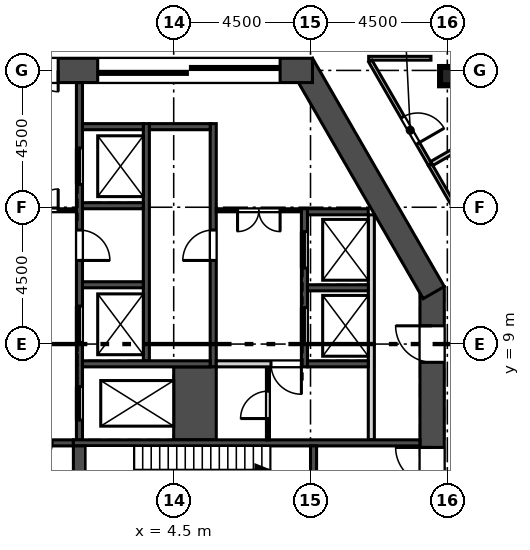
"""IFC4 building model, lengths in metres.
Left out: names, types, materials, properties, quantities, classifications, styles, units other than length and angle.
Written with IfcOpenShell. Run it as: python <this file> out.ifc"""

import sys

from ifc_helpers import new_model, si_unit, direction, frame, frame_2d, origin, origin_2d, place, context, subcontext, project, spatial, rectangle, hollow_rectangle, extrude, element, fill, save


model = new_model("IFC4")
c1 = context("Model", 3, precision=1e-05, world=origin(), true_north=direction((0.0, 1.0)))
c2 = subcontext(c1, "Body", "Model", "MODEL_VIEW")
j1 = project(units=[si_unit("LENGTHUNIT", "METRE"), si_unit("PLANEANGLEUNIT", "RADIAN")], contexts=[c1])
p1 = place(None, origin())
s1 = spatial("IfcSite", under=j1, at=p1, CompositionType="ELEMENT")
p2 = place(p1, origin())
s2 = spatial("IfcBuilding", under=s1, at=p2, CompositionType="ELEMENT")
p3 = place(p2, frame((0.0, 0.0, 344.7)))
s3 = spatial("IfcBuildingStorey", under=s2, at=p3, CompositionType="ELEMENT", Elevation=344.7)
p4 = place(p3, frame((13.562, 17.812, 0.0), z_axis=(0.0, 0.0, 1.0), x_axis=(1.0, 0.0, 0.0)))
e1 = element("IfcColumn", 1, at=p4, inside=s3, PredefinedType="COLUMN", context=c2, shape_type="SweptSolid", body=[
    extrude(hollow_rectangle(XDim=0.6, YDim=0.6, WallThickness=0.03, at=origin_2d()), origin(), (0.0, 0.0, 1.0), 4.8),
])
p5 = place(p3, frame((13.0, 1.45, 0.0), z_axis=(0.0, 0.0, 1.0), x_axis=(0.0, 1.0, 0.0)))
e2 = element("IfcWall", 2, at=p5, inside=s3, PredefinedType="SHEAR", context=c2, shape_type="SweptSolid", body=[
    extrude(rectangle(XDim=9.442, YDim=0.8, at=frame_2d((4.721, 0.0))), origin(), (0.0, 0.0, 1.0), 4.8),
])
p6 = place(p5, frame((2.95, 0.0, 0.0)))
e3 = element("IfcOpeningElement", 3, at=p6, cuts=e2, PredefinedType="OPENING", context=c2, shape_type="SweptSolid", body=[
    extrude(rectangle(XDim=1.2, YDim=2.1, at=frame_2d((0.6, 1.05))), frame((0.0, 0.41, 0.0), z_axis=(0.0, -1.0, 0.0), x_axis=(1.0, 0.0, 0.0)), (0.0, 0.0, 1.0), 0.82),
])
p7 = place(p5, frame((6.95, 0.0, 0.0)))
e4 = element("IfcOpeningElement", 4, at=p7, cuts=e2, PredefinedType="OPENING", context=c2, shape_type="SweptSolid", body=[
    extrude(rectangle(XDim=1.2, YDim=2.1, at=frame_2d((0.6, 1.05))), frame((0.0, 0.41, 0.0), z_axis=(0.0, -1.0, 0.0), x_axis=(1.0, 0.0, 0.0)), (0.0, 0.0, 1.0), 0.82),
])
p8 = place(p3, frame((13.054, 10.692, 0.0), z_axis=(0.0, 0.0, 1.0), x_axis=(-0.500015780397, 0.866016292776, 0.0)))
e5 = element("IfcWall", 5, at=p8, inside=s3, PredefinedType="SHEAR", context=c2, shape_type="SweptSolid", body=[
    extrude(rectangle(XDim=8.67, YDim=0.8, at=frame_2d((4.335, 0.0))), origin(), (0.0, 0.0, 1.0), 4.8),
])
p9 = place(p3, frame((9.065, 18.0, 0.0), z_axis=(0.0, 0.0, 1.0), x_axis=(-1.0, 0.0, 0.0)))
e6 = element("IfcWall", 6, at=p9, inside=s3, PredefinedType="SHEAR", context=c2, shape_type="SweptSolid", body=[
    extrude(rectangle(XDim=18.13, YDim=0.8, at=frame_2d((9.065, 0.0))), origin(), (0.0, 0.0, 1.0), 4.8),
])
p10 = place(p9, frame((8.365, 0.0, 0.0)))
e7 = element("IfcOpeningElement", 7, at=p10, cuts=e6, PredefinedType="OPENING", context=c2, shape_type="SweptSolid", body=[
    extrude(rectangle(XDim=1.4, YDim=2.1, at=frame_2d((0.7, 1.05))), frame((0.0, 0.41, 0.0), z_axis=(0.0, -1.0, 0.0), x_axis=(1.0, 0.0, 0.0)), (0.0, 0.0, 1.0), 0.82),
])
p11 = place(p9, frame((11.065, 0.0, 0.0)))
e8 = element("IfcOpeningElement", 8, at=p11, cuts=e6, PredefinedType="OPENING", context=c2, shape_type="SweptSolid", body=[
    extrude(rectangle(XDim=6.0, YDim=2.4, at=frame_2d((3.0, 1.2))), frame((0.0, 0.41, 0.0), z_axis=(0.0, -1.0, 0.0), x_axis=(1.0, 0.0, 0.0)), (0.0, 0.0, 1.0), 0.82),
])
p12 = place(p9, frame((1.065, 0.0, 0.0)))
e9 = element("IfcOpeningElement", 9, at=p12, cuts=e6, PredefinedType="OPENING", context=c2, shape_type="SweptSolid", body=[
    extrude(rectangle(XDim=6.0, YDim=2.4, at=frame_2d((3.0, 1.2))), frame((0.0, 0.41, 0.0), z_axis=(0.0, -1.0, 0.0), x_axis=(1.0, 0.0, 0.0)), (0.0, 0.0, 1.0), 0.82),
])
p13 = place(p3, frame((11.0, 5.85, 0.0), z_axis=(0.0, 0.0, 1.0), x_axis=(0.0, 1.0, 0.0)))
e10 = element("IfcWall", 10, at=p13, inside=s3, PredefinedType="SOLIDWALL", context=c2, shape_type="SweptSolid", body=[
    extrude(rectangle(XDim=7.4, YDim=0.2, at=frame_2d((3.7, 0.0))), origin(), (0.0, 0.0, 1.0), 4.8),
])
p14 = place(p3, frame((8.8, 8.25, -0.8), z_axis=(0.0, 0.0, 1.0), x_axis=(0.0, 1.0, 0.0)))
e11 = element("IfcWall", 11, at=p14, inside=s3, PredefinedType="SOLIDWALL", context=c2, shape_type="SweptSolid", body=[
    extrude(rectangle(XDim=5.2, YDim=0.2, at=frame_2d((2.6, 0.0))), origin(), (0.0, 0.0, 1.0), 5.6),
])
p15 = place(p14, frame((0.75, 0.0, 0.8)))
e12 = element("IfcOpeningElement", 12, at=p15, cuts=e11, PredefinedType="OPENING", context=c2, shape_type="SweptSolid", body=[
    extrude(rectangle(XDim=1.2, YDim=2.1, at=frame_2d((0.6, 1.05))), frame((0.0, 0.11, 0.0), z_axis=(0.0, -1.0, 0.0), x_axis=(1.0, 0.0, 0.0)), (0.0, 0.0, 1.0), 0.22),
])
p16 = place(p14, frame((3.25, 0.0, 0.8)))
e13 = element("IfcOpeningElement", 13, at=p16, cuts=e11, PredefinedType="OPENING", context=c2, shape_type="SweptSolid", body=[
    extrude(rectangle(XDim=1.2, YDim=2.1, at=frame_2d((0.6, 1.05))), frame((0.0, 0.11, 0.0), z_axis=(0.0, -1.0, 0.0), x_axis=(1.0, 0.0, 0.0)), (0.0, 0.0, 1.0), 0.22),
])
p17 = place(p3, frame((5.8, 8.25, -0.8), z_axis=(0.0, 0.0, 1.0), x_axis=(0.0, 1.0, 0.0)))
e14 = element("IfcWall", 14, at=p17, inside=s3, PredefinedType="SOLIDWALL", context=c2, shape_type="SweptSolid", body=[
    extrude(rectangle(XDim=8.0, YDim=0.2, at=frame_2d((4.0, 0.0))), origin(), (0.0, 0.0, 1.0), 5.6),
])
p18 = place(p17, frame((3.5, 0.0, 0.8)))
e15 = element("IfcOpeningElement", 15, at=p18, cuts=e14, PredefinedType="OPENING", context=c2, shape_type="SweptSolid", body=[
    extrude(rectangle(XDim=1.0, YDim=2.1, at=frame_2d((0.5, 1.05))), frame((0.0, 0.11, 0.0), z_axis=(0.0, -1.0, 0.0), x_axis=(1.0, 0.0, 0.0)), (0.0, 0.0, 1.0), 0.22),
])
p19 = place(p3, frame((3.6, 8.45, -0.8), z_axis=(0.0, 0.0, 1.0), x_axis=(0.0, 1.0, 0.0)))
e16 = element("IfcWall", 16, at=p19, inside=s3, PredefinedType="SOLIDWALL", context=c2, shape_type="SweptSolid", body=[
    extrude(rectangle(XDim=7.8, YDim=0.2, at=frame_2d((3.9, 0.0))), origin(), (0.0, 0.0, 1.0), 5.6),
])
p20 = place(p3, frame((1.4, 5.85, -0.8), z_axis=(0.0, 0.0, 1.0), x_axis=(0.0, 1.0, 0.0)))
e17 = element("IfcWall", 17, at=p20, inside=s3, PredefinedType="SOLIDWALL", context=c2, shape_type="SweptSolid", body=[
    extrude(rectangle(XDim=11.75, YDim=0.2, at=frame_2d((5.875, 0.0))), origin(), (0.0, 0.0, 1.0), 5.6),
])
p21 = place(p20, frame((3.2, 0.0, 0.8)))
e18 = element("IfcOpeningElement", 18, at=p21, cuts=e17, PredefinedType="OPENING", context=c2, shape_type="SweptSolid", body=[
    extrude(rectangle(XDim=1.2, YDim=2.1, at=frame_2d((0.6, 1.05))), frame((0.0, 0.11, 0.0), z_axis=(0.0, -1.0, 0.0), x_axis=(1.0, 0.0, 0.0)), (0.0, 0.0, 1.0), 0.22),
])
p22 = place(p20, frame((8.4, 0.0, 0.8)))
e19 = element("IfcOpeningElement", 19, at=p22, cuts=e17, PredefinedType="OPENING", context=c2, shape_type="SweptSolid", body=[
    extrude(rectangle(XDim=1.2, YDim=2.1, at=frame_2d((0.6, 1.05))), frame((0.0, 0.11, 0.0), z_axis=(0.0, -1.0, 0.0), x_axis=(1.0, 0.0, 0.0)), (0.0, 0.0, 1.0), 0.22),
])
p23 = place(p20, frame((0.65, 0.0, 0.8)))
e20 = element("IfcOpeningElement", 20, at=p23, cuts=e17, PredefinedType="OPENING", context=c2, shape_type="SweptSolid", body=[
    extrude(rectangle(XDim=1.1, YDim=2.1, at=frame_2d((0.55, 1.05))), frame((0.0, 0.11, 0.0), z_axis=(0.0, -1.0, 0.0), x_axis=(1.0, 0.0, 0.0)), (0.0, 0.0, 1.0), 0.22),
])
p24 = place(p20, frame((5.9, 0.0, 0.8)))
e21 = element("IfcOpeningElement", 21, at=p24, cuts=e17, PredefinedType="OPENING", context=c2, shape_type="SweptSolid", body=[
    extrude(rectangle(XDim=1.0, YDim=2.1, at=frame_2d((0.5, 1.05))), frame((0.0, 0.11, 0.0), z_axis=(0.0, -1.0, 0.0), x_axis=(1.0, 0.0, 0.0)), (0.0, 0.0, 1.0), 0.22),
])
p25 = place(p3, frame((5.2, 5.85, -0.8), z_axis=(0.0, 0.0, 1.0), x_axis=(0.0, 1.0, 0.0)))
e22 = element("IfcWall", 22, at=p25, inside=s3, PredefinedType="SOLIDWALL", context=c2, shape_type="SweptSolid", body=[
    extrude(rectangle(XDim=2.4, YDim=1.4, at=frame_2d((1.2, 0.0))), origin(), (0.0, 0.0, 1.0), 5.6),
])
p26 = place(p3, frame((8.9, 8.35, -0.8), z_axis=(0.0, 0.0, 1.0), x_axis=(1.0, 0.0, 0.0)))
e23 = element("IfcWall", 23, at=p26, inside=s3, PredefinedType="SOLIDWALL", context=c2, shape_type="SweptSolid", body=[
    extrude(rectangle(XDim=2.0, YDim=0.2, at=frame_2d((1.0, 0.0))), origin(), (0.0, 0.0, 1.0), 5.6),
])
p27 = place(p3, frame((1.5, 8.35, -0.8), z_axis=(0.0, 0.0, 1.0), x_axis=(1.0, 0.0, 0.0)))
e24 = element("IfcWall", 24, at=p27, inside=s3, PredefinedType="SOLIDWALL", context=c2, shape_type="SweptSolid", body=[
    extrude(rectangle(XDim=4.2, YDim=0.2, at=frame_2d((2.1, 0.0))), origin(), (0.0, 0.0, 1.0), 5.6),
])
p28 = place(p3, frame((-1.2, 5.75, -0.8), z_axis=(0.0, 0.0, 1.0), x_axis=(1.0, 0.0, 0.0)))
e25 = element("IfcWall", 25, at=p28, inside=s3, PredefinedType="SOLIDWALL", context=c2, shape_type="SweptSolid", body=[
    extrude(rectangle(XDim=2.4, YDim=0.2, at=frame_2d((1.2, 0.0))), origin(), (0.0, 0.0, 1.0), 5.6),
])
p29 = place(p28, frame((0.7, 0.0, 0.8)))
e26 = element("IfcOpeningElement", 26, at=p29, cuts=e25, PredefinedType="OPENING", context=c2, shape_type="SweptSolid", body=[
    extrude(rectangle(XDim=1.0, YDim=2.1, at=frame_2d((0.5, 1.05))), frame((0.0, 0.11, 0.0), z_axis=(0.0, -1.0, 0.0), x_axis=(1.0, 0.0, 0.0)), (0.0, 0.0, 1.0), 0.22),
])
p30 = place(p3, frame((1.2, 5.75, -0.8), z_axis=(0.0, 0.0, 1.0), x_axis=(1.0, 0.0, 0.0)))
e27 = element("IfcWall", 27, at=p30, inside=s3, PredefinedType="SOLIDWALL", context=c2, shape_type="SweptSolid", body=[
    extrude(rectangle(XDim=11.4, YDim=0.2, at=frame_2d((5.7, 0.0))), origin(), (0.0, 0.0, 1.0), 5.6),
])
p31 = place(p3, frame((9.1, 2.25, -0.8), z_axis=(0.0, 0.0, 1.0), x_axis=(0.0, 1.0, 0.0)))
e28 = element("IfcWall", 28, at=p31, inside=s3, PredefinedType="SOLIDWALL", context=c2, shape_type="SweptSolid", body=[
    extrude(rectangle(XDim=3.4, YDim=0.2, at=frame_2d((1.7, 0.0))), origin(), (0.0, 0.0, 1.0), 5.6),
])
p32 = place(p31, frame((0.2, 0.0, 0.8)))
e29 = element("IfcOpeningElement", 29, at=p32, cuts=e28, PredefinedType="OPENING", context=c2, shape_type="SweptSolid", body=[
    extrude(rectangle(XDim=1.2, YDim=2.1, at=frame_2d((0.6, 1.05))), frame((0.0, 0.11, 0.0), z_axis=(0.0, -1.0, 0.0), x_axis=(1.0, 0.0, 0.0)), (0.0, 0.0, 1.0), 0.22),
])
p33 = place(p3, frame((1.4, 2.25, -0.8), z_axis=(0.0, 0.0, 1.0), x_axis=(0.0, 1.0, 0.0)))
e30 = element("IfcWall", 30, at=p33, inside=s3, PredefinedType="SOLIDWALL", context=c2, shape_type="SweptSolid", body=[
    extrude(rectangle(XDim=3.4, YDim=0.4, at=frame_2d((1.7, 0.0))), origin(), (0.0, 0.0, 1.0), 5.6),
])
for number, where, z_axis, x_axis in (
    (31, (8.9, 10.85, -0.8), (0.0, 0.0, 1.0), (1.0, 0.0, 0.0)),
    (32, (8.9, 13.35, -0.8), (0.0, 0.0, 1.0), (1.0, 0.0, 0.0)),
    (33, (3.7, 16.15, -0.8), (0.0, 0.0, 1.0), (1.0, 0.0, 0.0)),
    (34, (1.5, 10.95, -0.8), (0.0, 0.0, 1.0), (1.0, 0.0, 0.0)),
    (35, (1.5, 13.55, -0.8), (0.0, 0.0, 1.0), (1.0, 0.0, 0.0)),
    (36, (1.5, 16.15, -0.8), (0.0, 0.0, 1.0), (1.0, 0.0, 0.0)),
):
    element("IfcWall", number, at=place(p3, frame(where, z_axis=z_axis, x_axis=x_axis)), inside=s3, PredefinedType="SOLIDWALL", context=c2, shape_type="SweptSolid", body=[
        extrude(rectangle(XDim=2.0, YDim=0.2, at=frame_2d((1.0, 0.0))), origin(), (0.0, 0.0, 1.0), 5.6),
    ])
p34 = place(p3, frame((5.9, 13.4, 0.0), z_axis=(0.0, 0.0, 1.0), x_axis=(1.0, 0.0, 0.0)))
e37 = element("IfcWall", 37, at=p34, inside=s3, PredefinedType="PARTITIONING", context=c2, shape_type="SweptSolid", body=[
    extrude(rectangle(XDim=2.8, YDim=0.1, at=frame_2d((1.4, 0.0))), origin(), (0.0, 0.0, 1.0), 4.8),
])
p35 = place(p34, frame((0.7, 0.0, 0.0)))
e38 = element("IfcOpeningElement", 38, at=p35, cuts=e37, PredefinedType="OPENING", context=c2, shape_type="SweptSolid", body=[
    extrude(rectangle(XDim=1.4, YDim=2.1, at=frame_2d((0.7, 1.05))), frame((0.0, 0.06, 0.0), z_axis=(0.0, -1.0, 0.0), x_axis=(1.0, 0.0, 0.0)), (0.0, 0.0, 1.0), 0.12),
])
p36 = place(p3, frame((7.6, 5.85, 0.0), z_axis=(0.0, 0.0, 1.0), x_axis=(0.0, 1.0, 0.0)))
e39 = element("IfcWall", 39, at=p36, inside=s3, PredefinedType="PARTITIONING", context=c2, shape_type="SweptSolid", body=[
    extrude(rectangle(XDim=2.4, YDim=0.1, at=frame_2d((1.2, 0.0))), origin(), (0.0, 0.0, 1.0), 4.8),
])
p37 = place(p36, frame((0.7, 0.0, 0.0)))
e40 = element("IfcOpeningElement", 40, at=p37, cuts=e39, PredefinedType="OPENING", context=c2, shape_type="SweptSolid", body=[
    extrude(rectangle(XDim=0.9, YDim=2.1, at=frame_2d((0.45, 1.05))), frame((0.0, 0.06, 0.0), z_axis=(0.0, -1.0, 0.0), x_axis=(1.0, 0.0, 0.0)), (0.0, 0.0, 1.0), 0.12),
])
p38 = place(p3, frame((5.9, 8.35, 0.0), z_axis=(0.0, 0.0, 1.0), x_axis=(1.0, 0.0, 0.0)))
e41 = element("IfcWall", 41, at=p38, inside=s3, PredefinedType="SOLIDWALL", context=c2, shape_type="SweptSolid", body=[
    extrude(rectangle(XDim=2.8, YDim=0.2, at=frame_2d((1.4, 0.0))), origin(), (0.0, 0.0, 1.0), 4.8),
])
p39 = place(p38, frame((1.8, 0.0, 0.0)))
e42 = element("IfcOpeningElement", 42, at=p39, cuts=e41, PredefinedType="OPENING", context=c2, shape_type="SweptSolid", body=[
    extrude(rectangle(XDim=1.0, YDim=2.1, at=frame_2d((0.5, 1.05))), frame((0.0, 0.11, 0.0), z_axis=(0.0, -1.0, 0.0), x_axis=(1.0, 0.0, 0.0)), (0.0, 0.0, 1.0), 0.22),
])
p40 = place(p3, frame((-1.3, 13.4, 0.0), z_axis=(0.0, 0.0, 1.0), x_axis=(1.0, 0.0, 0.0)))
e43 = element("IfcWall", 43, at=p40, inside=s3, PredefinedType="PARTITIONING", context=c2, shape_type="SweptSolid", body=[
    extrude(rectangle(XDim=2.6, YDim=0.1, at=frame_2d((1.3, 0.0))), origin(), (0.0, 0.0, 1.0), 4.8),
])
p41 = place(p40, frame((0.6, 0.0, 0.0)))
e44 = element("IfcOpeningElement", 44, at=p41, cuts=e43, PredefinedType="OPENING", context=c2, shape_type="SweptSolid", body=[
    extrude(rectangle(XDim=1.4, YDim=2.1, at=frame_2d((0.7, 1.05))), frame((0.0, 0.06, 0.0), z_axis=(0.0, -1.0, 0.0), x_axis=(1.0, 0.0, 0.0)), (0.0, 0.0, 1.0), 0.12),
])
p42 = place(p3, frame((12.962, 18.4, 0.0), z_axis=(0.0, 0.0, 1.0), x_axis=(-1.0, 0.0, 0.0)))
e45 = element("IfcWall", 45, at=p42, inside=s3, PredefinedType="PARTITIONING", context=c2, shape_type="SweptSolid", body=[
    extrude(rectangle(XDim=2.049, YDim=0.125, at=frame_2d((1.025, 0.0))), origin(), (0.0, 0.0, 1.0), 4.8),
])
p43 = place(p3, frame((10.967, 18.306, 0.0), z_axis=(0.0, 0.0, 1.0), x_axis=(0.499996894828, -0.866027196549, 0.0)))
e46 = element("IfcWall", 46, at=p43, inside=s3, PredefinedType="PARTITIONING", context=c2, shape_type="SweptSolid", body=[
    extrude(rectangle(XDim=3.927, YDim=0.125, at=frame_2d((1.964, 0.0))), origin(), (0.0, 0.0, 1.0), 4.8),
])
p44 = place(p43, frame((2.125, 0.0, 0.0)))
e47 = element("IfcOpeningElement", 47, at=p44, cuts=e46, PredefinedType="OPENING", context=c2, shape_type="SweptSolid", body=[
    extrude(rectangle(XDim=1.0, YDim=2.1, at=frame_2d((0.5, 1.05))), frame((0.0, 0.073, 0.0), z_axis=(0.0, -1.0, 0.0), x_axis=(1.0, 0.0, 0.0)), (0.0, 0.0, 1.0), 0.145),
])
p45 = place(p3, frame((12.931, 14.905, 0.0), z_axis=(0.0, 0.0, 1.0), x_axis=(0.499984515995, -0.866034343295, 0.0)))
e48 = element("IfcWall", 48, at=p45, inside=s3, PredefinedType="PARTITIONING", context=c2, shape_type="SweptSolid", body=[
    extrude(rectangle(XDim=4.247, YDim=0.125, at=frame_2d((2.124, 0.0))), origin(), (0.0, 0.0, 1.0), 4.8),
])
p46 = place(p45, frame((1.998, 0.0, 0.0)))
e49 = element("IfcOpeningElement", 49, at=p46, cuts=e48, PredefinedType="OPENING", context=c2, shape_type="SweptSolid", body=[
    extrude(rectangle(XDim=1.0, YDim=2.1, at=frame_2d((0.5, 1.05))), frame((0.0, 0.073, 0.0), z_axis=(0.0, -1.0, 0.0), x_axis=(1.0, 0.0, 0.0)), (0.0, 0.0, 1.0), 0.145),
])
p47 = place(p3, frame((15.234, 16.235, 0.0), z_axis=(0.0, 0.0, 1.0), x_axis=(-0.866054111537, -0.499950273417, 0.0)))
e50 = element("IfcWall", 50, at=p47, inside=s3, PredefinedType="PARTITIONING", context=c2, shape_type="SweptSolid", body=[
    extrude(rectangle(XDim=2.597, YDim=0.15, at=frame_2d((1.299, 0.0))), origin(), (0.0, 0.0, 1.0), 4.8),
])
p48 = place(p15, origin())
e51 = element("IfcDoor", 51, at=p48, inside=s3, OperationType="SLIDING_TO_LEFT", PredefinedType="DOOR", context=c2, shape_type="SweptSolid", body=[
    extrude(rectangle(XDim=1.2, YDim=2.1, at=frame_2d((0.6, 1.05))), frame((0.0, 0.025, 0.0), z_axis=(0.0, -1.0, 0.0), x_axis=(1.0, 0.0, 0.0)), (0.0, 0.0, 1.0), 0.05),
])
fill(e12, e51)
p49 = place(p16, origin())
e52 = element("IfcDoor", 52, at=p49, inside=s3, OperationType="SLIDING_TO_LEFT", PredefinedType="DOOR", context=c2, shape_type="SweptSolid", body=[
    extrude(rectangle(XDim=1.2, YDim=2.1, at=frame_2d((0.6, 1.05))), frame((0.0, 0.025, 0.0), z_axis=(0.0, -1.0, 0.0), x_axis=(1.0, 0.0, 0.0)), (0.0, 0.0, 1.0), 0.05),
])
fill(e13, e52)
p50 = place(p21, origin())
e53 = element("IfcDoor", 53, at=p50, inside=s3, OperationType="SLIDING_TO_LEFT", PredefinedType="DOOR", context=c2, shape_type="SweptSolid", body=[
    extrude(rectangle(XDim=1.2, YDim=2.1, at=frame_2d((0.6, 1.05))), frame((0.0, 0.025, 0.0), z_axis=(0.0, -1.0, 0.0), x_axis=(1.0, 0.0, 0.0)), (0.0, 0.0, 1.0), 0.05),
])
fill(e18, e53)
p51 = place(p22, origin())
e54 = element("IfcDoor", 54, at=p51, inside=s3, OperationType="SLIDING_TO_LEFT", PredefinedType="DOOR", context=c2, shape_type="SweptSolid", body=[
    extrude(rectangle(XDim=1.2, YDim=2.1, at=frame_2d((0.6, 1.05))), frame((0.0, 0.025, 0.0), z_axis=(0.0, -1.0, 0.0), x_axis=(1.0, 0.0, 0.0)), (0.0, 0.0, 1.0), 0.05),
])
fill(e19, e54)
p52 = place(p23, origin())
e55 = element("IfcDoor", 55, at=p52, inside=s3, OperationType="SLIDING_TO_RIGHT", PredefinedType="DOOR", context=c2, shape_type="SweptSolid", body=[
    extrude(rectangle(XDim=1.1, YDim=2.1, at=frame_2d((0.55, 1.05))), frame((0.0, 0.025, 0.0), z_axis=(0.0, -1.0, 0.0), x_axis=(1.0, 0.0, 0.0)), (0.0, 0.0, 1.0), 0.05),
])
fill(e20, e55)
p53 = place(p18, origin())
e56 = element("IfcDoor", 56, at=p53, inside=s3, OperationType="SINGLE_SWING_LEFT", PredefinedType="DOOR", context=c2, shape_type="SweptSolid", body=[
    extrude(rectangle(XDim=1.0, YDim=2.1, at=frame_2d((0.5, 1.05))), frame((0.0, 0.025, 0.0), z_axis=(0.0, -1.0, 0.0), x_axis=(1.0, 0.0, 0.0)), (0.0, 0.0, 1.0), 0.05),
])
fill(e15, e56)
p54 = place(p24, frame((1.0, 0.0, 0.0), z_axis=(0.0, 0.0, 1.0), x_axis=(-1.0, 0.0, 0.0)))
e57 = element("IfcDoor", 57, at=p54, inside=s3, OperationType="SINGLE_SWING_RIGHT", PredefinedType="DOOR", context=c2, shape_type="SweptSolid", body=[
    extrude(rectangle(XDim=1.0, YDim=2.1, at=frame_2d((0.5, 1.05))), frame((0.0, 0.025, 0.0), z_axis=(0.0, -1.0, 0.0), x_axis=(1.0, 0.0, 0.0)), (0.0, 0.0, 1.0), 0.05),
])
fill(e21, e57)
p55 = place(p35, frame((1.4, 0.0, 0.0), z_axis=(0.0, 0.0, 1.0), x_axis=(-1.0, 0.0, 0.0)))
e58 = element("IfcDoor", 58, at=p55, inside=s3, OperationType="DOUBLE_DOOR_SINGLE_SWING", PredefinedType="DOOR", context=c2, shape_type="SweptSolid", body=[
    extrude(rectangle(XDim=1.4, YDim=2.1, at=frame_2d((0.7, 1.05))), frame((0.0, 0.025, 0.0), z_axis=(0.0, -1.0, 0.0), x_axis=(1.0, 0.0, 0.0)), (0.0, 0.0, 1.0), 0.05),
])
fill(e38, e58)
p56 = place(p39, frame((1.0, 0.0, 0.0), z_axis=(0.0, 0.0, 1.0), x_axis=(-1.0, 0.0, 0.0)))
e59 = element("IfcDoor", 59, at=p56, inside=s3, OperationType="SINGLE_SWING_LEFT", PredefinedType="DOOR", context=c2, shape_type="SweptSolid", body=[
    extrude(rectangle(XDim=1.0, YDim=2.1, at=frame_2d((0.5, 1.05))), frame((0.0, 0.025, 0.0), z_axis=(0.0, -1.0, 0.0), x_axis=(1.0, 0.0, 0.0)), (0.0, 0.0, 1.0), 0.05),
])
fill(e42, e59)
p57 = place(p37, origin())
e60 = element("IfcDoor", 60, at=p57, inside=s3, OperationType="SINGLE_SWING_LEFT", PredefinedType="DOOR", context=c2, shape_type="SweptSolid", body=[
    extrude(rectangle(XDim=0.9, YDim=2.1, at=frame_2d((0.45, 1.05))), frame((0.0, 0.025, 0.0), z_axis=(0.0, -1.0, 0.0), x_axis=(1.0, 0.0, 0.0)), (0.0, 0.0, 1.0), 0.05),
])
fill(e40, e60)
p58 = place(p6, origin())
e61 = element("IfcDoor", 61, at=p58, inside=s3, OperationType="SINGLE_SWING_RIGHT", PredefinedType="DOOR", context=c2, shape_type="SweptSolid", body=[
    extrude(rectangle(XDim=1.2, YDim=2.1, at=frame_2d((0.6, 1.05))), frame((0.0, 0.025, 0.0), z_axis=(0.0, -1.0, 0.0), x_axis=(1.0, 0.0, 0.0)), (0.0, 0.0, 1.0), 0.05),
])
fill(e3, e61)
p59 = place(p7, origin())
e62 = element("IfcDoor", 62, at=p59, inside=s3, OperationType="SINGLE_SWING_RIGHT", PredefinedType="DOOR", context=c2, shape_type="SweptSolid", body=[
    extrude(rectangle(XDim=1.2, YDim=2.1, at=frame_2d((0.6, 1.05))), frame((0.0, 0.025, 0.0), z_axis=(0.0, -1.0, 0.0), x_axis=(1.0, 0.0, 0.0)), (0.0, 0.0, 1.0), 0.05),
])
fill(e4, e62)
p60 = place(p41, origin())
e63 = element("IfcDoor", 63, at=p60, inside=s3, OperationType="DOUBLE_DOOR_SINGLE_SWING", PredefinedType="DOOR", context=c2, shape_type="SweptSolid", body=[
    extrude(rectangle(XDim=1.4, YDim=2.1, at=frame_2d((0.7, 1.05))), frame((0.0, 0.025, 0.0), z_axis=(0.0, -1.0, 0.0), x_axis=(1.0, 0.0, 0.0)), (0.0, 0.0, 1.0), 0.05),
])
fill(e44, e63)
p61 = place(p10, origin())
e64 = element("IfcDoor", 64, at=p61, inside=s3, OperationType="DOUBLE_DOOR_SINGLE_SWING", PredefinedType="DOOR", context=c2, shape_type="SweptSolid", body=[
    extrude(rectangle(XDim=1.4, YDim=2.1, at=frame_2d((0.7, 1.05))), frame((0.0, 0.025, 0.0), z_axis=(0.0, -1.0, 0.0), x_axis=(1.0, 0.0, 0.0)), (0.0, 0.0, 1.0), 0.05),
])
fill(e7, e64)
p62 = place(p12, origin())
e65 = element("IfcDoor", 65, at=p62, inside=s3, OperationType="DOUBLE_DOOR_SLIDING", PredefinedType="DOOR", context=c2, shape_type="SweptSolid", body=[
    extrude(rectangle(XDim=6.0, YDim=2.4, at=frame_2d((3.0, 1.2))), frame((0.0, 0.025, 0.0), z_axis=(0.0, -1.0, 0.0), x_axis=(1.0, 0.0, 0.0)), (0.0, 0.0, 1.0), 0.05),
])
fill(e9, e65)
p63 = place(p44, origin())
e66 = element("IfcDoor", 66, at=p63, inside=s3, OperationType="SINGLE_SWING_RIGHT", PredefinedType="DOOR", context=c2, shape_type="SweptSolid", body=[
    extrude(rectangle(XDim=1.0, YDim=2.1, at=frame_2d((0.5, 1.05))), frame((0.0, 0.025, 0.0), z_axis=(0.0, -1.0, 0.0), x_axis=(1.0, 0.0, 0.0)), (0.0, 0.0, 1.0), 0.05),
])
fill(e47, e66)
save(model, sys.argv[1])
